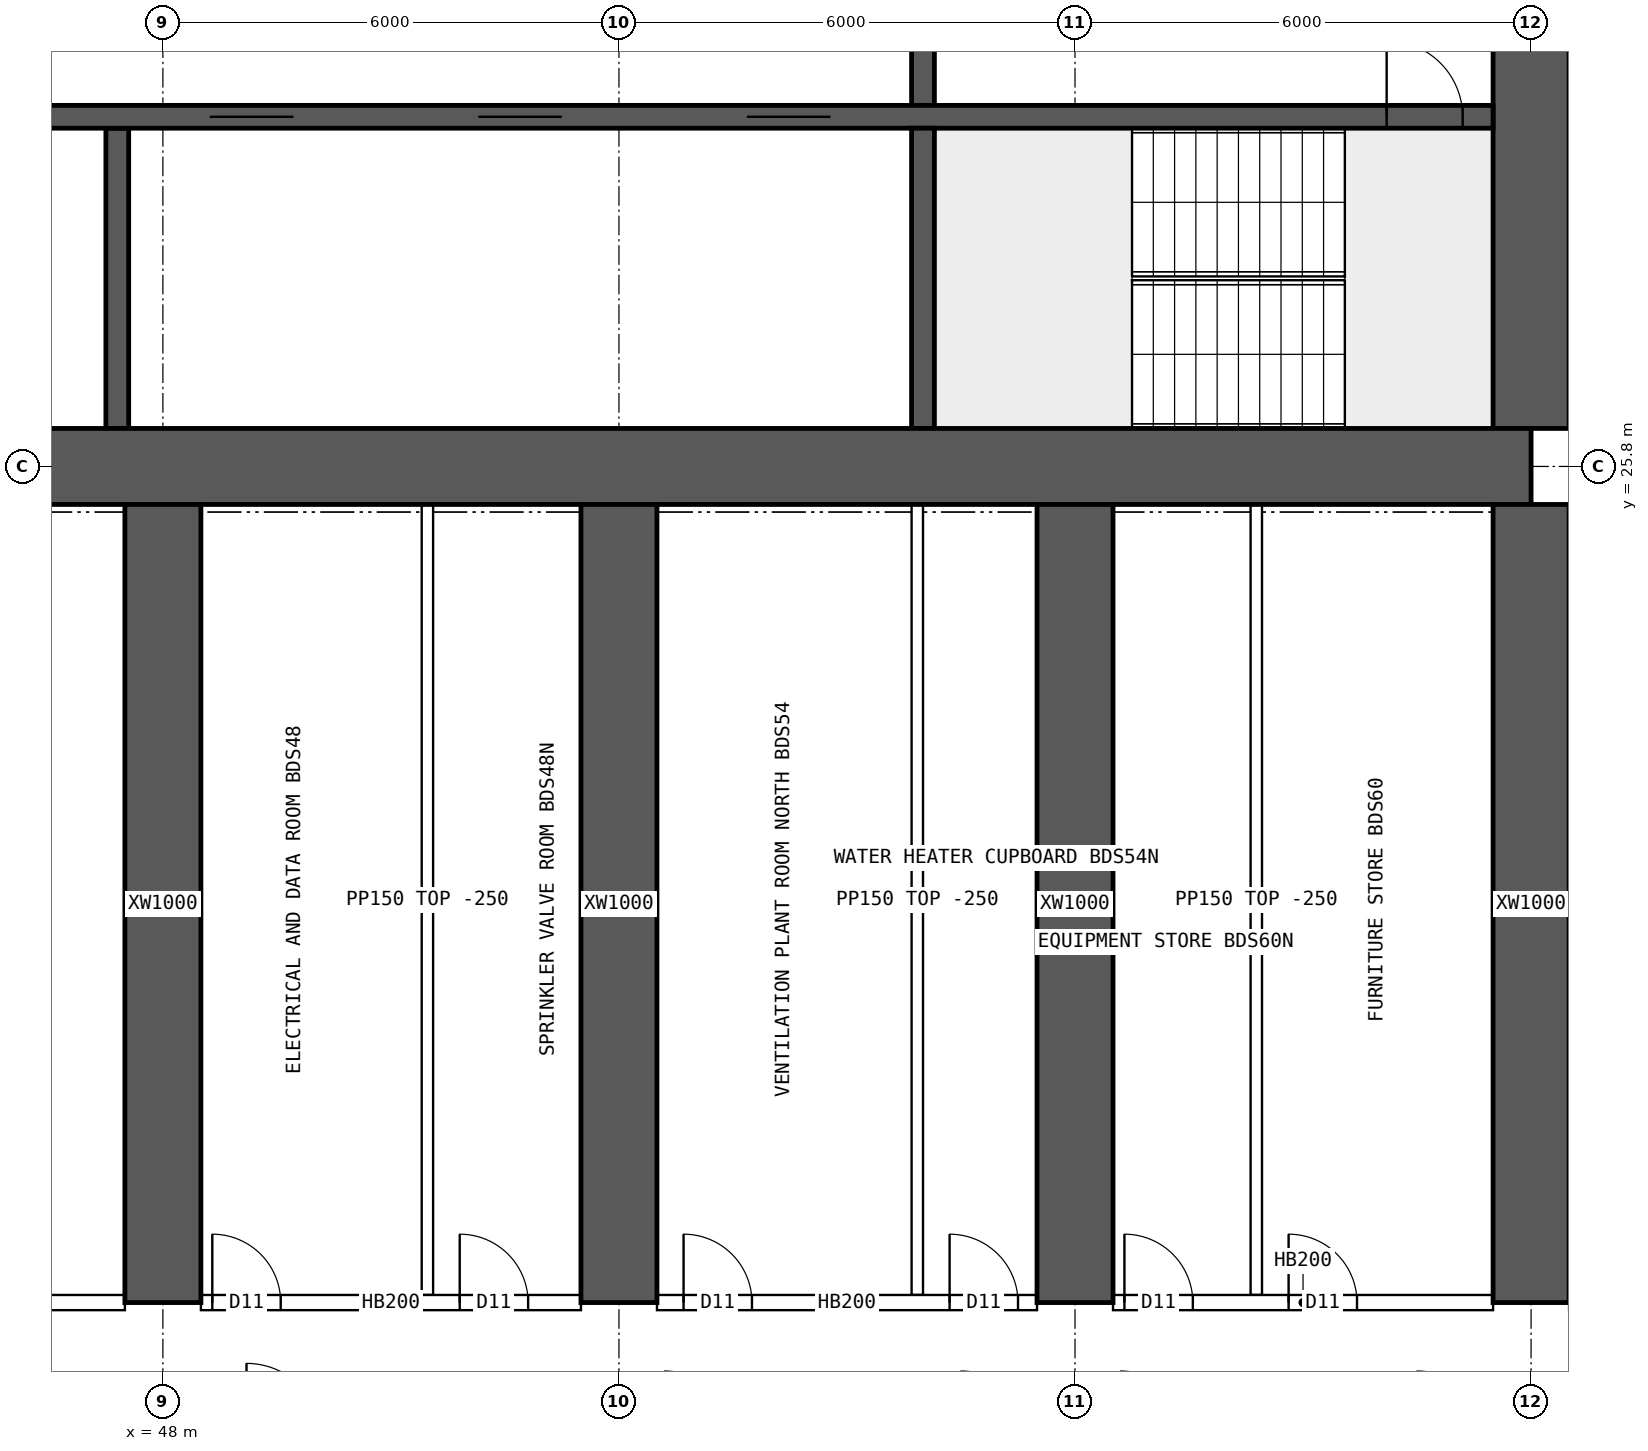
"""IFC4 building model, lengths in metres.
Left out: names, types, materials, properties, quantities, classifications, styles, units other than length and angle.
Written with IfcOpenShell. Run it as: python <this file> out.ifc"""

import sys

from ifc_helpers import new_model, si_unit, direction, frame, frame_2d, origin, place, context, subcontext, project, spatial, rectangle, extrude, element, fill, save


model = new_model("IFC4")
c1 = context("Model", 3, precision=1e-05, world=origin(), true_north=direction((0.0, 1.0)))
c2 = subcontext(c1, "Body", "Model", "MODEL_VIEW")
j1 = project(units=[si_unit("LENGTHUNIT", "METRE"), si_unit("PLANEANGLEUNIT", "RADIAN")], contexts=[c1])
p1 = place(None, origin())
s1 = spatial("IfcSite", under=j1, at=p1, CompositionType="ELEMENT")
p2 = place(p1, origin())
s2 = spatial("IfcBuilding", under=s1, at=p2, CompositionType="ELEMENT")
p3 = place(p2, frame((0.0, 0.0, 38.95)))
s3 = spatial("IfcBuildingStorey", under=s2, at=p3, CompositionType="ELEMENT", Elevation=38.95)
p4 = place(p3, frame((18.0, 25.8, 0.0), z_axis=(0.0, 0.0, 1.0), x_axis=(1.0, 0.0, 0.0)))
e1 = element("IfcWall", 1, at=p4, inside=s3, PredefinedType="SHEAR", context=c2, shape_type="SweptSolid", body=[
    extrude(rectangle(XDim=48.0, YDim=1.0, at=frame_2d((24.0, 0.0))), origin(), (0.0, 0.0, 1.0), 3.75),
])
p5 = place(p3, frame((66.0, 26.3, 0.0), z_axis=(0.0, 0.0, 1.0), x_axis=(0.0, 1.0, 0.0)))
e2 = element("IfcWall", 2, at=p5, inside=s3, PredefinedType="SHEAR", context=c2, shape_type="SweptSolid", body=[
    extrude(rectangle(XDim=11.4, YDim=1.0, at=frame_2d((5.7, 0.0))), origin(), (0.0, 0.0, 1.0), 3.75),
])
p6 = place(p5, frame((5.0, 0.0, 0.0)))
e3 = element("IfcOpeningElement", 3, at=p6, cuts=e2, PredefinedType="OPENING", context=c2, shape_type="SweptSolid", body=[
    extrude(rectangle(XDim=1.2, YDim=2.1, at=frame_2d((0.6, 1.05))), frame((0.0, 0.51, 0.0), z_axis=(0.0, -1.0, 0.0), x_axis=(1.0, 0.0, 0.0)), (0.0, 0.0, 1.0), 1.02),
])
p7 = place(p3, frame((18.5, 30.4, 0.0), z_axis=(0.0, 0.0, 1.0), x_axis=(1.0, 0.0, 0.0)))
e4 = element("IfcWall", 4, at=p7, inside=s3, PredefinedType="SHEAR", context=c2, shape_type="SweptSolid", body=[
    extrude(rectangle(XDim=47.0, YDim=0.3, at=frame_2d((23.5, 0.0))), origin(), (0.0, 0.0, 1.0), 3.75),
])
p8 = place(p7, frame((0.4, 0.0, 0.0)))
e5 = element("IfcOpeningElement", 5, at=p8, cuts=e4, PredefinedType="OPENING", context=c2, shape_type="SweptSolid", body=[
    extrude(rectangle(XDim=1.0, YDim=2.1, at=frame_2d((0.5, 1.05))), frame((0.0, 0.16, 0.0), z_axis=(0.0, -1.0, 0.0), x_axis=(1.0, 0.0, 0.0)), (0.0, 0.0, 1.0), 0.32),
])
p9 = place(p7, frame((45.6, 0.0, 0.0)))
e6 = element("IfcOpeningElement", 6, at=p9, cuts=e4, PredefinedType="OPENING", context=c2, shape_type="SweptSolid", body=[
    extrude(rectangle(XDim=1.0, YDim=2.1, at=frame_2d((0.5, 1.05))), frame((0.0, 0.16, 0.0), z_axis=(0.0, -1.0, 0.0), x_axis=(1.0, 0.0, 0.0)), (0.0, 0.0, 1.0), 0.32),
])
p10 = place(p7, frame((8.25, 0.0, 0.0)))
e7 = element("IfcOpeningElement", 7, at=p10, cuts=e4, PredefinedType="OPENING", context=c2, shape_type="SweptSolid", body=[
    extrude(rectangle(XDim=1.1, YDim=2.1, at=frame_2d((0.55, 1.05))), frame((0.0, 0.16, 0.0), z_axis=(0.0, -1.0, 0.0), x_axis=(1.0, 0.0, 0.0)), (0.0, 0.0, 1.0), 0.32),
])
p11 = place(p7, frame((10.85, 0.0, 0.0)))
e8 = element("IfcOpeningElement", 8, at=p11, cuts=e4, PredefinedType="OPENING", context=c2, shape_type="SweptSolid", body=[
    extrude(rectangle(XDim=1.1, YDim=2.1, at=frame_2d((0.55, 1.05))), frame((0.0, 0.16, 0.0), z_axis=(0.0, -1.0, 0.0), x_axis=(1.0, 0.0, 0.0)), (0.0, 0.0, 1.0), 0.32),
])
p12 = place(p7, frame((13.45, 0.0, 0.0)))
e9 = element("IfcOpeningElement", 9, at=p12, cuts=e4, PredefinedType="OPENING", context=c2, shape_type="SweptSolid", body=[
    extrude(rectangle(XDim=1.1, YDim=2.1, at=frame_2d((0.55, 1.05))), frame((0.0, 0.16, 0.0), z_axis=(0.0, -1.0, 0.0), x_axis=(1.0, 0.0, 0.0)), (0.0, 0.0, 1.0), 0.32),
])
p13 = place(p7, frame((16.05, 0.0, 0.0)))
e10 = element("IfcOpeningElement", 10, at=p13, cuts=e4, PredefinedType="OPENING", context=c2, shape_type="SweptSolid", body=[
    extrude(rectangle(XDim=1.1, YDim=2.1, at=frame_2d((0.55, 1.05))), frame((0.0, 0.16, 0.0), z_axis=(0.0, -1.0, 0.0), x_axis=(1.0, 0.0, 0.0)), (0.0, 0.0, 1.0), 0.32),
])
p14 = place(p7, frame((30.117, 0.0, 0.0)))
e11 = element("IfcOpeningElement", 11, at=p14, cuts=e4, PredefinedType="OPENING", context=c2, shape_type="SweptSolid", body=[
    extrude(rectangle(XDim=1.1, YDim=2.1, at=frame_2d((0.55, 1.05))), frame((0.0, 0.16, 0.0), z_axis=(0.0, -1.0, 0.0), x_axis=(1.0, 0.0, 0.0)), (0.0, 0.0, 1.0), 0.32),
])
p15 = place(p7, frame((33.65, 0.0, 0.0)))
e12 = element("IfcOpeningElement", 12, at=p15, cuts=e4, PredefinedType="OPENING", context=c2, shape_type="SweptSolid", body=[
    extrude(rectangle(XDim=1.1, YDim=2.1, at=frame_2d((0.55, 1.05))), frame((0.0, 0.16, 0.0), z_axis=(0.0, -1.0, 0.0), x_axis=(1.0, 0.0, 0.0)), (0.0, 0.0, 1.0), 0.32),
])
p16 = place(p7, frame((37.183, 0.0, 0.0)))
e13 = element("IfcOpeningElement", 13, at=p16, cuts=e4, PredefinedType="OPENING", context=c2, shape_type="SweptSolid", body=[
    extrude(rectangle(XDim=1.1, YDim=2.1, at=frame_2d((0.55, 1.05))), frame((0.0, 0.16, 0.0), z_axis=(0.0, -1.0, 0.0), x_axis=(1.0, 0.0, 0.0)), (0.0, 0.0, 1.0), 0.32),
])
p17 = place(p3, frame((58.0, 26.3, 0.0), z_axis=(0.0, 0.0, 1.0), x_axis=(0.0, 1.0, 0.0)))
e14 = element("IfcWall", 14, at=p17, inside=s3, PredefinedType="SHEAR", context=c2, shape_type="SweptSolid", body=[
    extrude(rectangle(XDim=3.95, YDim=0.3, at=frame_2d((1.975, 0.0))), origin(), (0.0, 0.0, 1.0), 3.75),
])
p18 = place(p3, frame((58.0, 30.55, 0.0), z_axis=(0.0, 0.0, 1.0), x_axis=(0.0, 1.0, 0.0)))
e15 = element("IfcWall", 15, at=p18, inside=s3, PredefinedType="SHEAR", context=c2, shape_type="SweptSolid", body=[
    extrude(rectangle(XDim=3.9, YDim=0.3, at=frame_2d((1.95, 0.0))), origin(), (0.0, 0.0, 1.0), 3.75),
])
p19 = place(p18, frame((1.4, 0.0, 0.0)))
e16 = element("IfcOpeningElement", 16, at=p19, cuts=e15, PredefinedType="OPENING", context=c2, shape_type="SweptSolid", body=[
    extrude(rectangle(XDim=1.2, YDim=2.1, at=frame_2d((0.6, 1.05))), frame((0.0, 0.16, 0.0), z_axis=(0.0, -1.0, 0.0), x_axis=(1.0, 0.0, 0.0)), (0.0, 0.0, 1.0), 0.32),
])
p20 = place(p3, frame((47.4, 26.3, 0.0), z_axis=(0.0, 0.0, 1.0), x_axis=(0.0, 1.0, 0.0)))
e17 = element("IfcWall", 17, at=p20, inside=s3, PredefinedType="SHEAR", context=c2, shape_type="SweptSolid", body=[
    extrude(rectangle(XDim=3.95, YDim=0.3, at=frame_2d((1.975, 0.0))), origin(), (0.0, 0.0, 1.0), 3.75),
])
for number, where, z_axis, x_axis in (
    (18, (48.0, 14.8, 0.0), (0.0, 0.0, 1.0), (0.0, 1.0, 0.0)),
    (19, (54.0, 14.8, 0.0), (0.0, 0.0, 1.0), (0.0, 1.0, 0.0)),
    (20, (60.0, 14.8, 0.0), (0.0, 0.0, 1.0), (0.0, 1.0, 0.0)),
    (21, (66.0, 14.8, 0.0), (0.0, 0.0, 1.0), (0.0, 1.0, 0.0)),
):
    element("IfcWall", number, at=place(p3, frame(where, z_axis=z_axis, x_axis=x_axis)), inside=s3, PredefinedType="SHEAR", context=c2, shape_type="SweptSolid", body=[
        extrude(rectangle(XDim=10.5, YDim=1.0, at=frame_2d((5.25, 0.0))), origin(), (0.0, 0.0, 1.0), 3.75),
    ])
p21 = place(p3, frame((42.5, 14.8, 0.0), z_axis=(0.0, 0.0, 1.0), x_axis=(1.0, 0.0, 0.0)))
e22 = element("IfcWall", 22, at=p21, inside=s3, PredefinedType="SOLIDWALL", context=c2, shape_type="SweptSolid", body=[
    extrude(rectangle(XDim=5.0, YDim=0.2, at=frame_2d((2.5, 0.0))), origin(), (0.0, 0.0, 1.0), 3.5),
])
p22 = place(p21, frame((0.8, 0.0, 0.0)))
e23 = element("IfcOpeningElement", 23, at=p22, cuts=e22, PredefinedType="OPENING", context=c2, shape_type="SweptSolid", body=[
    extrude(rectangle(XDim=1.0, YDim=2.1, at=frame_2d((0.5, 1.05))), frame((0.0, 0.11, 0.0), z_axis=(0.0, -1.0, 0.0), x_axis=(1.0, 0.0, 0.0)), (0.0, 0.0, 1.0), 0.22),
])
p23 = place(p3, frame((48.5, 14.8, 0.0), z_axis=(0.0, 0.0, 1.0), x_axis=(1.0, 0.0, 0.0)))
e24 = element("IfcWall", 24, at=p23, inside=s3, PredefinedType="SOLIDWALL", context=c2, shape_type="SweptSolid", body=[
    extrude(rectangle(XDim=5.0, YDim=0.2, at=frame_2d((2.5, 0.0))), origin(), (0.0, 0.0, 1.0), 3.5),
])
p24 = place(p23, frame((0.15, 0.0, 0.0)))
e25 = element("IfcOpeningElement", 25, at=p24, cuts=e24, PredefinedType="OPENING", context=c2, shape_type="SweptSolid", body=[
    extrude(rectangle(XDim=0.9, YDim=2.1, at=frame_2d((0.45, 1.05))), frame((0.0, 0.11, 0.0), z_axis=(0.0, -1.0, 0.0), x_axis=(1.0, 0.0, 0.0)), (0.0, 0.0, 1.0), 0.22),
])
p25 = place(p23, frame((3.405, 0.0, 0.0)))
e26 = element("IfcOpeningElement", 26, at=p25, cuts=e24, PredefinedType="OPENING", context=c2, shape_type="SweptSolid", body=[
    extrude(rectangle(XDim=0.9, YDim=2.1, at=frame_2d((0.45, 1.05))), frame((0.0, 0.11, 0.0), z_axis=(0.0, -1.0, 0.0), x_axis=(1.0, 0.0, 0.0)), (0.0, 0.0, 1.0), 0.22),
])
p26 = place(p3, frame((54.5, 14.8, 0.0), z_axis=(0.0, 0.0, 1.0), x_axis=(1.0, 0.0, 0.0)))
e27 = element("IfcWall", 27, at=p26, inside=s3, PredefinedType="SOLIDWALL", context=c2, shape_type="SweptSolid", body=[
    extrude(rectangle(XDim=5.0, YDim=0.2, at=frame_2d((2.5, 0.0))), origin(), (0.0, 0.0, 1.0), 3.5),
])
p27 = place(p26, frame((0.35, 0.0, 0.0)))
e28 = element("IfcOpeningElement", 28, at=p27, cuts=e27, PredefinedType="OPENING", context=c2, shape_type="SweptSolid", body=[
    extrude(rectangle(XDim=0.9, YDim=2.1, at=frame_2d((0.45, 1.05))), frame((0.0, 0.11, 0.0), z_axis=(0.0, -1.0, 0.0), x_axis=(1.0, 0.0, 0.0)), (0.0, 0.0, 1.0), 0.22),
])
p28 = place(p26, frame((3.85, 0.0, 0.0)))
e29 = element("IfcOpeningElement", 29, at=p28, cuts=e27, PredefinedType="OPENING", context=c2, shape_type="SweptSolid", body=[
    extrude(rectangle(XDim=0.9, YDim=2.1, at=frame_2d((0.45, 1.05))), frame((0.0, 0.11, 0.0), z_axis=(0.0, -1.0, 0.0), x_axis=(1.0, 0.0, 0.0)), (0.0, 0.0, 1.0), 0.22),
])
p29 = place(p3, frame((60.5, 14.8, 0.0), z_axis=(0.0, 0.0, 1.0), x_axis=(1.0, 0.0, 0.0)))
e30 = element("IfcWall", 30, at=p29, inside=s3, PredefinedType="SOLIDWALL", context=c2, shape_type="SweptSolid", body=[
    extrude(rectangle(XDim=5.0, YDim=0.2, at=frame_2d((2.5, 0.0))), origin(), (0.0, 0.0, 1.0), 3.5),
])
p30 = place(p29, frame((0.15, 0.0, 0.0)))
e31 = element("IfcOpeningElement", 31, at=p30, cuts=e30, PredefinedType="OPENING", context=c2, shape_type="SweptSolid", body=[
    extrude(rectangle(XDim=0.9, YDim=2.1, at=frame_2d((0.45, 1.05))), frame((0.0, 0.11, 0.0), z_axis=(0.0, -1.0, 0.0), x_axis=(1.0, 0.0, 0.0)), (0.0, 0.0, 1.0), 0.22),
])
p31 = place(p29, frame((2.31, 0.0, 0.0)))
e32 = element("IfcOpeningElement", 32, at=p31, cuts=e30, PredefinedType="OPENING", context=c2, shape_type="SweptSolid", body=[
    extrude(rectangle(XDim=0.9, YDim=2.1, at=frame_2d((0.45, 1.05))), frame((0.0, 0.11, 0.0), z_axis=(0.0, -1.0, 0.0), x_axis=(1.0, 0.0, 0.0)), (0.0, 0.0, 1.0), 0.22),
])
for number, where, z_axis, x_axis in (
    (33, (51.48, 14.9, 0.0), (0.0, 0.0, 1.0), (0.0, 1.0, 0.0)),
    (34, (57.925, 14.9, 0.0), (0.0, 0.0, 1.0), (0.0, 1.0, 0.0)),
    (35, (62.385, 14.9, 0.0), (0.0, 0.0, 1.0), (0.0, 1.0, 0.0)),
):
    element("IfcWall", number, at=place(p3, frame(where, z_axis=z_axis, x_axis=x_axis)), inside=s3, PredefinedType="PARTITIONING", context=c2, shape_type="SweptSolid", body=[
        extrude(rectangle(XDim=10.4, YDim=0.15, at=frame_2d((5.2, 0.0))), origin(), (0.0, 0.0, 1.0), 3.5),
    ])
p32 = place(p9, origin())
e36 = element("IfcDoor", 36, at=p32, inside=s3, OperationType="SINGLE_SWING_LEFT", PredefinedType="DOOR", context=c2, shape_type="SweptSolid", body=[
    extrude(rectangle(XDim=1.0, YDim=2.1, at=frame_2d((0.5, 1.05))), frame((0.0, 0.025, 0.0), z_axis=(0.0, -1.0, 0.0), x_axis=(1.0, 0.0, 0.0)), (0.0, 0.0, 1.0), 0.05),
])
fill(e6, e36)
p33 = place(p14, origin())
e37 = element("IfcDoor", 37, at=p33, inside=s3, OperationType="DOUBLE_DOOR_SLIDING", PredefinedType="DOOR", context=c2, shape_type="SweptSolid", body=[
    extrude(rectangle(XDim=1.1, YDim=2.1, at=frame_2d((0.55, 1.05))), frame((0.0, 0.025, 0.0), z_axis=(0.0, -1.0, 0.0), x_axis=(1.0, 0.0, 0.0)), (0.0, 0.0, 1.0), 0.05),
])
fill(e11, e37)
p34 = place(p15, origin())
e38 = element("IfcDoor", 38, at=p34, inside=s3, OperationType="DOUBLE_DOOR_SLIDING", PredefinedType="DOOR", context=c2, shape_type="SweptSolid", body=[
    extrude(rectangle(XDim=1.1, YDim=2.1, at=frame_2d((0.55, 1.05))), frame((0.0, 0.025, 0.0), z_axis=(0.0, -1.0, 0.0), x_axis=(1.0, 0.0, 0.0)), (0.0, 0.0, 1.0), 0.05),
])
fill(e12, e38)
p35 = place(p16, origin())
e39 = element("IfcDoor", 39, at=p35, inside=s3, OperationType="DOUBLE_DOOR_SLIDING", PredefinedType="DOOR", context=c2, shape_type="SweptSolid", body=[
    extrude(rectangle(XDim=1.1, YDim=2.1, at=frame_2d((0.55, 1.05))), frame((0.0, 0.025, 0.0), z_axis=(0.0, -1.0, 0.0), x_axis=(1.0, 0.0, 0.0)), (0.0, 0.0, 1.0), 0.05),
])
fill(e13, e39)
p36 = place(p24, origin())
e40 = element("IfcDoor", 40, at=p36, inside=s3, OperationType="SINGLE_SWING_LEFT", PredefinedType="DOOR", context=c2, shape_type="SweptSolid", body=[
    extrude(rectangle(XDim=0.9, YDim=2.1, at=frame_2d((0.45, 1.05))), frame((0.0, 0.025, 0.0), z_axis=(0.0, -1.0, 0.0), x_axis=(1.0, 0.0, 0.0)), (0.0, 0.0, 1.0), 0.05),
])
fill(e25, e40)
p37 = place(p25, origin())
e41 = element("IfcDoor", 41, at=p37, inside=s3, OperationType="SINGLE_SWING_LEFT", PredefinedType="DOOR", context=c2, shape_type="SweptSolid", body=[
    extrude(rectangle(XDim=0.9, YDim=2.1, at=frame_2d((0.45, 1.05))), frame((0.0, 0.025, 0.0), z_axis=(0.0, -1.0, 0.0), x_axis=(1.0, 0.0, 0.0)), (0.0, 0.0, 1.0), 0.05),
])
fill(e26, e41)
p38 = place(p27, origin())
e42 = element("IfcDoor", 42, at=p38, inside=s3, OperationType="SINGLE_SWING_LEFT", PredefinedType="DOOR", context=c2, shape_type="SweptSolid", body=[
    extrude(rectangle(XDim=0.9, YDim=2.1, at=frame_2d((0.45, 1.05))), frame((0.0, 0.025, 0.0), z_axis=(0.0, -1.0, 0.0), x_axis=(1.0, 0.0, 0.0)), (0.0, 0.0, 1.0), 0.05),
])
fill(e28, e42)
p39 = place(p28, origin())
e43 = element("IfcDoor", 43, at=p39, inside=s3, OperationType="SINGLE_SWING_LEFT", PredefinedType="DOOR", context=c2, shape_type="SweptSolid", body=[
    extrude(rectangle(XDim=0.9, YDim=2.1, at=frame_2d((0.45, 1.05))), frame((0.0, 0.025, 0.0), z_axis=(0.0, -1.0, 0.0), x_axis=(1.0, 0.0, 0.0)), (0.0, 0.0, 1.0), 0.05),
])
fill(e29, e43)
p40 = place(p30, origin())
e44 = element("IfcDoor", 44, at=p40, inside=s3, OperationType="SINGLE_SWING_LEFT", PredefinedType="DOOR", context=c2, shape_type="SweptSolid", body=[
    extrude(rectangle(XDim=0.9, YDim=2.1, at=frame_2d((0.45, 1.05))), frame((0.0, 0.025, 0.0), z_axis=(0.0, -1.0, 0.0), x_axis=(1.0, 0.0, 0.0)), (0.0, 0.0, 1.0), 0.05),
])
fill(e31, e44)
p41 = place(p31, origin())
e45 = element("IfcDoor", 45, at=p41, inside=s3, OperationType="SINGLE_SWING_LEFT", PredefinedType="DOOR", context=c2, shape_type="SweptSolid", body=[
    extrude(rectangle(XDim=0.9, YDim=2.1, at=frame_2d((0.45, 1.05))), frame((0.0, 0.025, 0.0), z_axis=(0.0, -1.0, 0.0), x_axis=(1.0, 0.0, 0.0)), (0.0, 0.0, 1.0), 0.05),
])
fill(e32, e45)
save(model, sys.argv[1])
